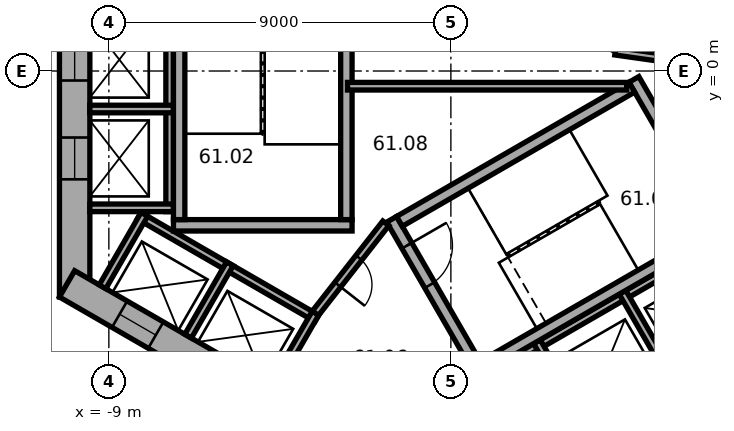
"""IFC4 building model, lengths in metres.
Left out: names, types, materials, properties, quantities, classifications, styles, units other than length and angle.
Written with IfcOpenShell. Run it as: python <this file> out.ifc"""

import sys

from ifc_helpers import new_model, si_unit, direction, frame, frame_2d, origin, place, context, subcontext, project, spatial, rectangle, extrude, element, fill, save


model = new_model("IFC4")
c1 = context("Model", 3, precision=1e-05, world=origin(), true_north=direction((0.0, 1.0)))
c2 = subcontext(c1, "Body", "Model", "MODEL_VIEW")
j1 = project(units=[si_unit("LENGTHUNIT", "METRE"), si_unit("PLANEANGLEUNIT", "RADIAN")], contexts=[c1])
p1 = place(None, origin())
s1 = spatial("IfcSite", under=j1, at=p1, CompositionType="ELEMENT")
p2 = place(p1, origin())
s2 = spatial("IfcBuilding", under=s1, at=p2, CompositionType="ELEMENT")
p3 = place(p2, frame((0.0, 0.0, 247.6)))
s3 = spatial("IfcBuildingStorey", under=s2, at=p3, CompositionType="ELEMENT", Elevation=247.6)
p4 = place(p3, frame((-9.9, 5.947, 0.0), z_axis=(0.0, 0.0, 1.0), x_axis=(0.0, -1.0, 0.0)))
e1 = element("IfcWall", 1, at=p4, inside=s3, PredefinedType="SHEAR", context=c2, shape_type="SweptSolid", body=[
    extrude(rectangle(XDim=11.894, YDim=0.8, at=frame_2d((5.947, 0.0))), origin(), (0.0, 0.0, 1.0), 3.7),
])
p5 = place(p4, frame((5.097, 0.0, 0.0)))
e2 = element("IfcOpeningElement", 2, at=p5, cuts=e1, PredefinedType="OPENING", context=c2, shape_type="SweptSolid", body=[
    extrude(rectangle(XDim=1.1, YDim=2.1, at=frame_2d((0.55, 1.05))), frame((0.0, 0.41, 0.0), z_axis=(0.0, -1.0, 0.0), x_axis=(1.0, 0.0, 0.0)), (0.0, 0.0, 1.0), 0.82),
])
p6 = place(p4, frame((7.697, 0.0, 0.0)))
e3 = element("IfcOpeningElement", 3, at=p6, cuts=e1, PredefinedType="OPENING", context=c2, shape_type="SweptSolid", body=[
    extrude(rectangle(XDim=1.1, YDim=2.1, at=frame_2d((0.55, 1.05))), frame((0.0, 0.41, 0.0), z_axis=(0.0, -1.0, 0.0), x_axis=(1.0, 0.0, 0.0)), (0.0, 0.0, 1.0), 0.82),
])
p7 = place(p3, frame((-10.1, -5.6, 0.0), z_axis=(0.0, 0.0, 1.0), x_axis=(0.866023897231, -0.500002609418, 0.0)))
e4 = element("IfcWall", 4, at=p7, inside=s3, PredefinedType="SHEAR", context=c2, shape_type="SweptSolid", body=[
    extrude(rectangle(XDim=11.894, YDim=0.8, at=frame_2d((5.947, 0.0))), origin(), (0.0, 0.0, 1.0), 3.7),
])
p8 = place(p7, frame((6.147, 0.0, 0.0)))
e5 = element("IfcOpeningElement", 5, at=p8, cuts=e4, PredefinedType="OPENING", context=c2, shape_type="SweptSolid", body=[
    extrude(rectangle(XDim=1.5, YDim=2.1, at=frame_2d((0.75, 1.05))), frame((0.0, 0.41, 0.0), z_axis=(0.0, -1.0, 0.0), x_axis=(1.0, 0.0, 0.0)), (0.0, 0.0, 1.0), 0.82),
])
p9 = place(p7, frame((1.597, 0.0, 0.0)))
e6 = element("IfcOpeningElement", 6, at=p9, cuts=e4, PredefinedType="OPENING", context=c2, shape_type="SweptSolid", body=[
    extrude(rectangle(XDim=1.1, YDim=2.1, at=frame_2d((0.55, 1.05))), frame((0.0, 0.41, 0.0), z_axis=(0.0, -1.0, 0.0), x_axis=(1.0, 0.0, 0.0)), (0.0, 0.0, 1.0), 0.82),
])
p10 = place(p7, frame((4.197, 0.0, 0.0)))
e7 = element("IfcOpeningElement", 7, at=p10, cuts=e4, PredefinedType="OPENING", context=c2, shape_type="SweptSolid", body=[
    extrude(rectangle(XDim=1.1, YDim=2.1, at=frame_2d((0.55, 1.05))), frame((0.0, 0.41, 0.0), z_axis=(0.0, -1.0, 0.0), x_axis=(1.0, 0.0, 0.0)), (0.0, 0.0, 1.0), 0.82),
])
p11 = place(p3, frame((-0.2, -11.547, 0.0), z_axis=(0.0, 0.0, 1.0), x_axis=(0.866023897231, 0.500002609418, 0.0)))
e8 = element("IfcWall", 8, at=p11, inside=s3, PredefinedType="SHEAR", context=c2, shape_type="SweptSolid", body=[
    extrude(rectangle(XDim=11.894, YDim=0.8, at=frame_2d((5.947, 0.0))), origin(), (0.0, 0.0, 1.0), 3.7),
])
p12 = place(p11, frame((2.497, 0.0, 0.0)))
e9 = element("IfcOpeningElement", 9, at=p12, cuts=e8, PredefinedType="OPENING", context=c2, shape_type="SweptSolid", body=[
    extrude(rectangle(XDim=1.1, YDim=2.1, at=frame_2d((0.55, 1.05))), frame((0.0, 0.41, 0.0), z_axis=(0.0, -1.0, 0.0), x_axis=(1.0, 0.0, 0.0)), (0.0, 0.0, 1.0), 0.82),
])
p13 = place(p11, frame((5.097, 0.0, 0.0)))
e10 = element("IfcOpeningElement", 10, at=p13, cuts=e8, PredefinedType="OPENING", context=c2, shape_type="SweptSolid", body=[
    extrude(rectangle(XDim=1.1, YDim=2.1, at=frame_2d((0.55, 1.05))), frame((0.0, 0.41, 0.0), z_axis=(0.0, -1.0, 0.0), x_axis=(1.0, 0.0, 0.0)), (0.0, 0.0, 1.0), 0.82),
])
p14 = place(p11, frame((7.697, 0.0, 0.0)))
e11 = element("IfcOpeningElement", 11, at=p14, cuts=e8, PredefinedType="OPENING", context=c2, shape_type="SweptSolid", body=[
    extrude(rectangle(XDim=1.1, YDim=2.1, at=frame_2d((0.55, 1.05))), frame((0.0, 0.41, 0.0), z_axis=(0.0, -1.0, 0.0), x_axis=(1.0, 0.0, 0.0)), (0.0, 0.0, 1.0), 0.82),
])
p15 = place(p3, frame((-7.4, 4.3, 0.0), z_axis=(0.0, 0.0, 1.0), x_axis=(0.0, -1.0, 0.0)))
e12 = element("IfcWall", 12, at=p15, inside=s3, PredefinedType="PARTITIONING", context=c2, shape_type="SweptSolid", body=[
    extrude(rectangle(XDim=8.0, YDim=0.2, at=frame_2d((4.0, 0.0))), origin(), (0.0, 0.0, 1.0), 3.42),
])
for number, where, z_axis, x_axis in (
    (13, (-7.3, -1.0, 0.0), (0.0, 0.0, 1.0), (-1.0, 0.0, 0.0)),
    (14, (-7.3, -3.6, 0.0), (0.0, 0.0, 1.0), (-1.0, 0.0, 0.0)),
):
    element("IfcWall", number, at=place(p3, frame(where, z_axis=z_axis, x_axis=x_axis)), inside=s3, PredefinedType="PARTITIONING", context=c2, shape_type="SweptSolid", body=[
        extrude(rectangle(XDim=2.2, YDim=0.2, at=frame_2d((1.1, 0.0))), origin(), (0.0, 0.0, 1.0), 3.42),
    ])
p16 = place(p3, frame((-8.203, -3.809, 0.0), z_axis=(0.0, 0.0, 1.0), x_axis=(0.866028230842, -0.499995103361, 0.0)))
e15 = element("IfcWall", 15, at=p16, inside=s3, PredefinedType="PARTITIONING", context=c2, shape_type="SweptSolid", body=[
    extrude(rectangle(XDim=5.4, YDim=0.2, at=frame_2d((2.7, 0.0))), origin(), (0.0, 0.0, 1.0), 3.42),
])
for number, where, z_axis, x_axis in (
    (16, (-8.067, -3.772, 0.0), (0.0, 0.0, 1.0), (-0.5, -0.866, 0.0)),
    (17, (-5.815, -5.072, 0.0), (0.0, 0.0, 1.0), (-0.5, -0.866, 0.0)),
):
    element("IfcWall", number, at=place(p3, frame(where, z_axis=z_axis, x_axis=x_axis)), inside=s3, PredefinedType="PARTITIONING", context=c2, shape_type="SweptSolid", body=[
        extrude(rectangle(XDim=2.2, YDim=0.2, at=frame_2d((1.1, 0.0))), origin(), (0.0, 0.0, 1.0), 3.42),
    ])
p17 = place(p3, frame((-3.563, -6.372, 0.0), z_axis=(0.0, 0.0, 1.0), x_axis=(-0.499994660107, -0.866028486751, 0.0)))
e18 = element("IfcWall", 18, at=p17, inside=s3, PredefinedType="PARTITIONING", context=c2, shape_type="SweptSolid", body=[
    extrude(rectangle(XDim=2.2, YDim=0.2, at=frame_2d((1.1, 0.0))), origin(), (0.0, 0.0, 1.0), 3.42),
])
p18 = place(p3, frame((-0.024, -8.559, 0.0), z_axis=(0.0, 0.0, 1.0), x_axis=(0.866026010844, 0.49999894854, 0.0)))
e19 = element("IfcWall", 19, at=p18, inside=s3, PredefinedType="PARTITIONING", context=c2, shape_type="SweptSolid", body=[
    extrude(rectangle(XDim=8.0, YDim=0.2, at=frame_2d((4.0, 0.0))), origin(), (0.0, 0.0, 1.0), 3.42),
])
for number, where, z_axis, x_axis in (
    (20, (2.264, -7.122, 0.0), (0.0, 0.0, 1.0), (0.5, -0.866, 0.0)),
    (21, (4.516, -5.822, 0.0), (0.0, 0.0, 1.0), (0.5, -0.866, 0.0)),
):
    element("IfcWall", number, at=place(p3, frame(where, z_axis=z_axis, x_axis=x_axis)), inside=s3, PredefinedType="PARTITIONING", context=c2, shape_type="SweptSolid", body=[
        extrude(rectangle(XDim=2.2, YDim=0.2, at=frame_2d((1.1, 0.0))), origin(), (0.0, 0.0, 1.0), 3.42),
    ])
p19 = place(p3, frame((-2.6, -4.06, 0.0), z_axis=(0.0, 0.0, 1.0), x_axis=(-1.0, 0.0, 0.0)))
e22 = element("IfcWall", 22, at=p19, inside=s3, PredefinedType="SHEAR", context=c2, shape_type="SweptSolid", body=[
    extrude(rectangle(XDim=4.7, YDim=0.3, at=frame_2d((2.35, 0.0))), origin(), (0.0, 0.0, 1.0), 3.42),
])
for number, where, z_axis, x_axis in (
    (23, (-2.75, 3.15, 0.0), (0.0, 0.0, 1.0), (0.0, -1.0, 0.0)),
    (24, (-7.15, 3.15, 0.0), (0.0, 0.0, 1.0), (0.0, -1.0, 0.0)),
):
    element("IfcWall", number, at=place(p3, frame(where, z_axis=z_axis, x_axis=x_axis)), inside=s3, PredefinedType="SHEAR", context=c2, shape_type="SweptSolid", body=[
        extrude(rectangle(XDim=7.06, YDim=0.3, at=frame_2d((3.53, 0.0))), origin(), (0.0, 0.0, 1.0), 3.42),
    ])
p20 = place(p3, frame((-1.558, -3.902, 0.0), z_axis=(0.0, 0.0, 1.0), x_axis=(0.499977259774, -0.866038532462, 0.0)))
e25 = element("IfcWall", 25, at=p20, inside=s3, PredefinedType="SHEAR", context=c2, shape_type="SweptSolid", body=[
    extrude(rectangle(XDim=4.7, YDim=0.3, at=frame_2d((2.35, 0.0))), origin(), (0.0, 0.0, 1.0), 3.42),
])
p21 = place(p20, frame((0.8, 0.0, 0.0)))
e26 = element("IfcOpeningElement", 26, at=p21, cuts=e25, PredefinedType="OPENING", context=c2, shape_type="SweptSolid", body=[
    extrude(rectangle(XDim=1.2, YDim=2.1, at=frame_2d((0.6, 1.05))), frame((0.0, 0.16, 0.0), z_axis=(0.0, -1.0, 0.0), x_axis=(1.0, 0.0, 0.0)), (0.0, 0.0, 1.0), 0.32),
])
p22 = place(p3, frame((4.816, -0.222, 0.0), z_axis=(0.0, 0.0, 1.0), x_axis=(0.499977259774, -0.866038532462, 0.0)))
e27 = element("IfcWall", 27, at=p22, inside=s3, PredefinedType="SHEAR", context=c2, shape_type="SweptSolid", body=[
    extrude(rectangle(XDim=4.7, YDim=0.3, at=frame_2d((2.35, 0.0))), origin(), (0.0, 0.0, 1.0), 3.42),
])
for number, where, z_axis, x_axis in (
    (28, (-1.353, -3.957, 0.0), (0.0, 0.0, 1.0), (0.866, 0.5, 0.0)),
    (29, (0.847, -7.767, 0.0), (0.0, 0.0, 1.0), (0.866, 0.5, 0.0)),
):
    element("IfcWall", number, at=place(p3, frame(where, z_axis=z_axis, x_axis=x_axis)), inside=s3, PredefinedType="SHEAR", context=c2, shape_type="SweptSolid", body=[
        extrude(rectangle(XDim=7.06, YDim=0.3, at=frame_2d((3.53, 0.0))), origin(), (0.0, 0.0, 1.0), 3.42),
    ])
p23 = place(p3, frame((4.327, 0.521, 0.0), z_axis=(0.0, 0.0, 1.0), x_axis=(0.990124376366, -0.14019172346, 0.0)))
e30 = element("IfcWall", 30, at=p23, inside=s3, PredefinedType="PARTITIONING", context=c2, shape_type="SweptSolid", body=[
    extrude(rectangle(XDim=3.002, YDim=0.2, at=frame_2d((1.501, 0.0))), origin(), (0.0, 0.0, 1.0), 3.42),
])
p24 = place(p3, frame((-1.712, -4.008, 0.0), z_axis=(0.0, 0.0, 1.0), x_axis=(-0.616549420702, -0.787316208287, 0.0)))
e31 = element("IfcWall", 31, at=p24, inside=s3, PredefinedType="PARTITIONING", context=c2, shape_type="SweptSolid", body=[
    extrude(rectangle(XDim=3.002, YDim=0.2, at=frame_2d((1.501, 0.0))), origin(), (0.0, 0.0, 1.0), 3.42),
])
p25 = place(p24, frame((1.15, 0.0, 0.0)))
e32 = element("IfcOpeningElement", 32, at=p25, cuts=e31, PredefinedType="OPENING", context=c2, shape_type="SweptSolid", body=[
    extrude(rectangle(XDim=0.9, YDim=2.1, at=frame_2d((0.45, 1.05))), frame((0.0, 0.11, 0.0), z_axis=(0.0, -1.0, 0.0), x_axis=(1.0, 0.0, 0.0)), (0.0, 0.0, 1.0), 0.22),
])
p26 = place(p3, frame((-2.72, -0.4, 0.0), z_axis=(0.0, 0.0, 1.0), x_axis=(1.0, 0.0, 0.0)))
e33 = element("IfcWall", 33, at=p26, inside=s3, PredefinedType="PARTITIONING", context=c2, shape_type="SweptSolid", body=[
    extrude(rectangle(XDim=7.347, YDim=0.2, at=frame_2d((3.674, 0.0))), origin(), (0.0, 0.0, 1.0), 3.42),
])
p27 = place(p21, origin())
e34 = element("IfcDoor", 34, at=p27, inside=s3, OperationType="SINGLE_SWING_RIGHT", PredefinedType="DOOR", context=c2, shape_type="SweptSolid", body=[
    extrude(rectangle(XDim=1.2, YDim=2.1, at=frame_2d((0.6, 1.05))), frame((0.0, 0.025, 0.0), z_axis=(0.0, -1.0, 0.0), x_axis=(1.0, 0.0, 0.0)), (0.0, 0.0, 1.0), 0.05),
])
fill(e26, e34)
p28 = place(p25, origin())
e35 = element("IfcDoor", 35, at=p28, inside=s3, OperationType="SINGLE_SWING_LEFT", PredefinedType="DOOR", context=c2, shape_type="SweptSolid", body=[
    extrude(rectangle(XDim=0.9, YDim=2.1, at=frame_2d((0.45, 1.05))), frame((0.0, 0.025, 0.0), z_axis=(0.0, -1.0, 0.0), x_axis=(1.0, 0.0, 0.0)), (0.0, 0.0, 1.0), 0.05),
])
fill(e32, e35)
p29 = place(p5, origin())
e36 = element("IfcDoor", 36, at=p29, inside=s3, OperationType="DOUBLE_DOOR_SLIDING", PredefinedType="DOOR", context=c2, shape_type="SweptSolid", body=[
    extrude(rectangle(XDim=1.1, YDim=2.1, at=frame_2d((0.55, 1.05))), frame((0.0, 0.025, 0.0), z_axis=(0.0, -1.0, 0.0), x_axis=(1.0, 0.0, 0.0)), (0.0, 0.0, 1.0), 0.05),
])
fill(e2, e36)
p30 = place(p6, origin())
e37 = element("IfcDoor", 37, at=p30, inside=s3, OperationType="DOUBLE_DOOR_SLIDING", PredefinedType="DOOR", context=c2, shape_type="SweptSolid", body=[
    extrude(rectangle(XDim=1.1, YDim=2.1, at=frame_2d((0.55, 1.05))), frame((0.0, 0.025, 0.0), z_axis=(0.0, -1.0, 0.0), x_axis=(1.0, 0.0, 0.0)), (0.0, 0.0, 1.0), 0.05),
])
fill(e3, e37)
p31 = place(p9, origin())
e38 = element("IfcDoor", 38, at=p31, inside=s3, OperationType="DOUBLE_DOOR_SLIDING", PredefinedType="DOOR", context=c2, shape_type="SweptSolid", body=[
    extrude(rectangle(XDim=1.1, YDim=2.1, at=frame_2d((0.55, 1.05))), frame((0.0, 0.025, 0.0), z_axis=(0.0, -1.0, 0.0), x_axis=(1.0, 0.0, 0.0)), (0.0, 0.0, 1.0), 0.05),
])
fill(e6, e38)
save(model, sys.argv[1])
